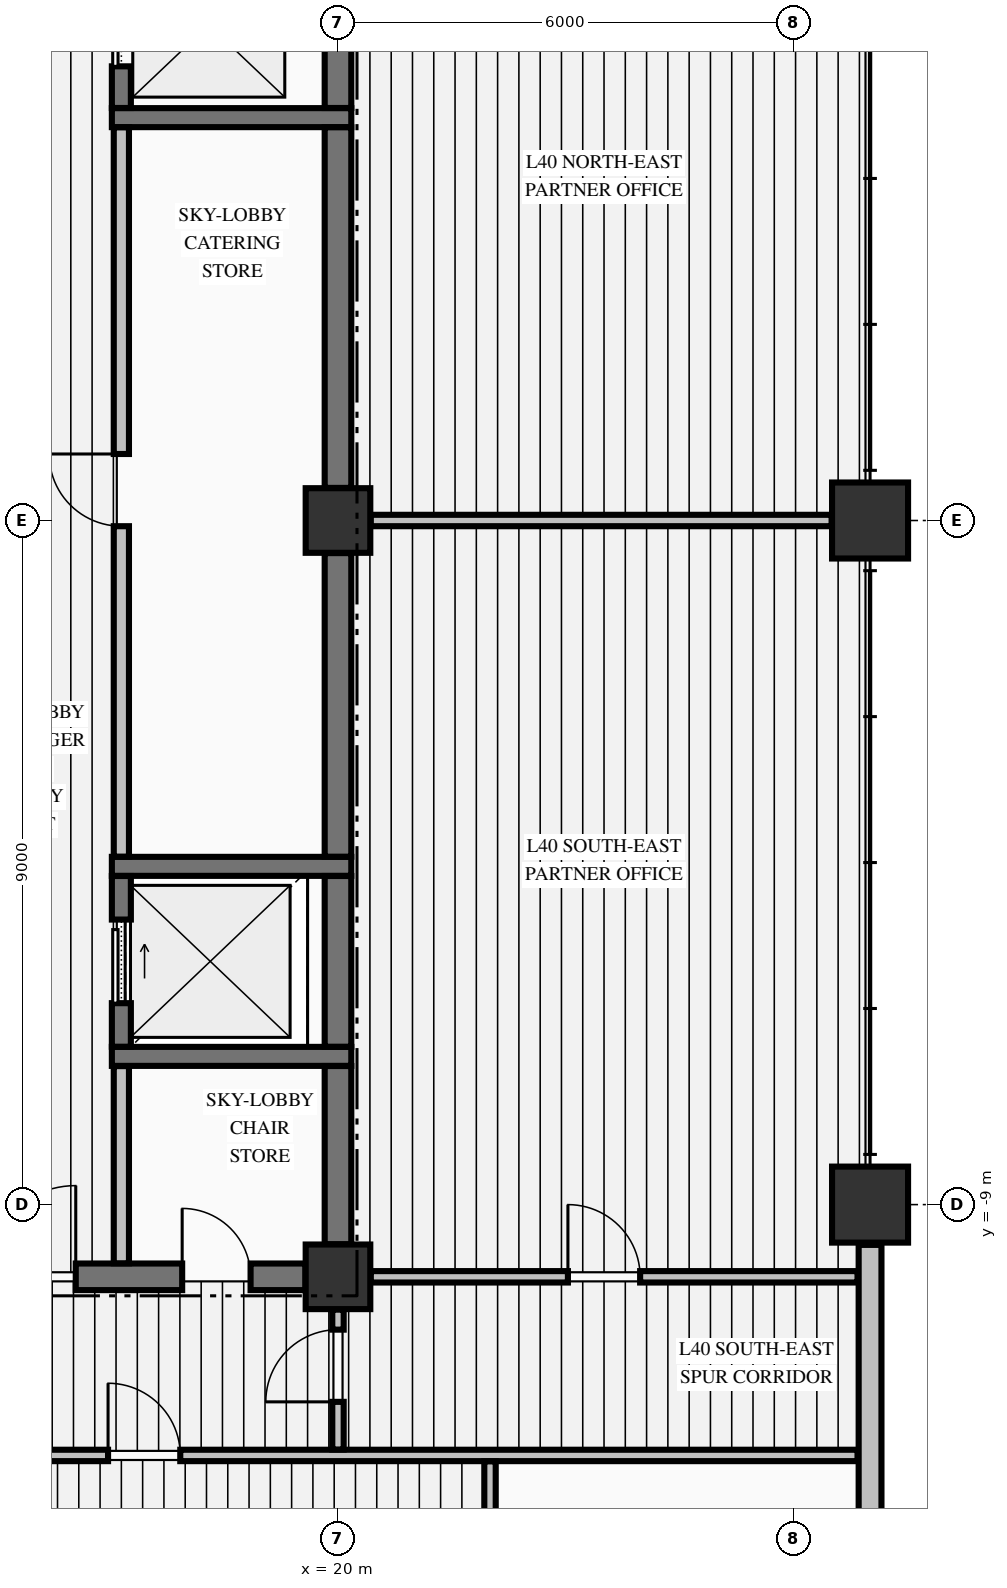
"""IFC4 building model, lengths in metres.
Left out: names, types, materials, properties, quantities, classifications, styles, units other than length and angle.
Written with IfcOpenShell. Run it as: python <this file> out.ifc"""

import sys

from ifc_helpers import new_model, si_unit, direction, frame, frame_2d, origin, origin_2d, place, context, subcontext, project, spatial, rectangle, extrude, element, fill, save


model = new_model("IFC4")
c1 = context("Model", 3, precision=1e-05, world=origin(), true_north=direction((0.0, 1.0)))
c2 = subcontext(c1, "Body", "Model", "MODEL_VIEW")
j1 = project(units=[si_unit("LENGTHUNIT", "METRE"), si_unit("PLANEANGLEUNIT", "RADIAN")], contexts=[c1])
p1 = place(None, origin())
s1 = spatial("IfcSite", under=j1, at=p1, CompositionType="ELEMENT")
p2 = place(p1, origin())
s2 = spatial("IfcBuilding", under=s1, at=p2, CompositionType="ELEMENT")
p3 = place(p2, frame((0.0, 0.0, 158.24)))
s3 = spatial("IfcBuildingStorey", under=s2, at=p3, CompositionType="ELEMENT", Elevation=158.24)
for number, where, z_axis, x_axis in (
    (1, (27.0, -9.0, -0.425), (0.0, 0.0, 1.0), (1.0, 0.0, 0.0)),
    (2, (27.0, 0.0, -0.425), (0.0, 0.0, 1.0), (1.0, 0.0, 0.0)),
):
    element("IfcColumn", number, at=place(p3, frame(where, z_axis=z_axis, x_axis=x_axis)), inside=s3, PredefinedType="COLUMN", context=c2, shape_type="SweptSolid", body=[
        extrude(rectangle(XDim=1.0, YDim=1.0, at=origin_2d()), origin(), (0.0, 0.0, 1.0), 4.595),
    ])
for number, where, z_axis, x_axis in (
    (3, (20.0, -9.95, -0.425), (0.0, 0.0, 1.0), (1.0, 0.0, 0.0)),
    (4, (20.0, 0.0, -0.425), (0.0, 0.0, 1.0), (1.0, 0.0, 0.0)),
):
    element("IfcColumn", number, at=place(p3, frame(where, z_axis=z_axis, x_axis=x_axis)), inside=s3, PredefinedType="COLUMN", context=c2, shape_type="SweptSolid", body=[
        extrude(rectangle(XDim=0.85, YDim=0.85, at=origin_2d()), origin(), (0.0, 0.0, 1.0), 4.595),
    ])
p4 = place(p3, frame((27.0, -18.97, 0.0), z_axis=(0.0, 0.0, 1.0), x_axis=(0.0, 1.0, 0.0)))
e5 = element("IfcWall", 5, at=p4, inside=s3, PredefinedType="STANDARD", context=c2, shape_type="SweptSolid", body=[
    extrude(rectangle(XDim=9.44, YDim=0.3, at=frame_2d((4.72, 0.0))), origin(), (0.0, 0.0, 1.0), 1.962),
])
p5 = place(p3, frame((14.7, -9.95, 0.0), z_axis=(0.0, 0.0, 1.0), x_axis=(1.0, 0.0, 0.0)))
e6 = element("IfcWall", 6, at=p5, inside=s3, PredefinedType="SHEAR", context=c2, shape_type="SweptSolid", body=[
    extrude(rectangle(XDim=4.871, YDim=0.35, at=frame_2d((2.436, 0.0))), origin(), (0.0, 0.0, 1.0), 4.17),
])
p6 = place(p5, frame((0.65, 0.0, 0.0)))
e7 = element("IfcOpeningElement", 7, at=p6, cuts=e6, PredefinedType="OPENING", context=c2, shape_type="SweptSolid", body=[
    extrude(rectangle(XDim=1.2, YDim=2.15, at=frame_2d((0.6, 1.075))), frame((0.0, 0.185, 0.0), z_axis=(0.0, -1.0, 0.0), x_axis=(1.0, 0.0, 0.0)), (0.0, 0.0, 1.0), 0.37),
])
p7 = place(p5, frame((3.25, 0.0, 0.0)))
e8 = element("IfcOpeningElement", 8, at=p7, cuts=e6, PredefinedType="OPENING", context=c2, shape_type="SweptSolid", body=[
    extrude(rectangle(XDim=0.9, YDim=2.15, at=frame_2d((0.45, 1.075))), frame((0.0, 0.185, 0.0), z_axis=(0.0, -1.0, 0.0), x_axis=(1.0, 0.0, 0.0)), (0.0, 0.0, 1.0), 0.37),
])
for number, where, z_axis, x_axis in (
    (9, (17.025, -7.05, 0.0), (0.0, 0.0, 1.0), (1.0, 0.0, 0.0)),
    (10, (17.025, -4.55, 0.0), (0.0, 0.0, 1.0), (1.0, 0.0, 0.0)),
    (11, (17.025, 5.3, 0.0), (0.0, 0.0, 1.0), (1.0, 0.0, 0.0)),
):
    element("IfcWall", number, at=place(p3, frame(where, z_axis=z_axis, x_axis=x_axis)), inside=s3, PredefinedType="SOLIDWALL", context=c2, shape_type="SweptSolid", body=[
        extrude(rectangle(XDim=3.15, YDim=0.25, at=frame_2d((1.575, 0.0))), origin(), (0.0, 0.0, 1.0), 4.17),
    ])
p8 = place(p3, frame((-20.075, -12.3, 0.0), z_axis=(0.0, 0.0, 1.0), x_axis=(1.0, 0.0, 0.0)))
e12 = element("IfcWall", 12, at=p8, inside=s3, PredefinedType="PARTITIONING", context=c2, shape_type="SweptSolid", body=[
    extrude(rectangle(XDim=46.91, YDim=0.15, at=frame_2d((23.455, 0.0))), origin(), (0.0, 0.0, 1.0), 4.17),
])
p9 = place(p8, frame((12.0, 0.0, 0.0)))
e13 = element("IfcOpeningElement", 13, at=p9, cuts=e12, PredefinedType="OPENING", context=c2, shape_type="SweptSolid", body=[
    extrude(rectangle(XDim=1.05, YDim=2.15, at=frame_2d((0.525, 1.075))), frame((0.0, 0.085, 0.0), z_axis=(0.0, -1.0, 0.0), x_axis=(1.0, 0.0, 0.0)), (0.0, 0.0, 1.0), 0.17),
])
p10 = place(p8, frame((16.4, 0.0, 0.0)))
e14 = element("IfcOpeningElement", 14, at=p10, cuts=e12, PredefinedType="OPENING", context=c2, shape_type="SweptSolid", body=[
    extrude(rectangle(XDim=0.95, YDim=2.15, at=frame_2d((0.475, 1.075))), frame((0.0, 0.085, 0.0), z_axis=(0.0, -1.0, 0.0), x_axis=(1.0, 0.0, 0.0)), (0.0, 0.0, 1.0), 0.17),
])
p11 = place(p8, frame((22.3, 0.0, 0.0)))
e15 = element("IfcOpeningElement", 15, at=p11, cuts=e12, PredefinedType="OPENING", context=c2, shape_type="SweptSolid", body=[
    extrude(rectangle(XDim=0.95, YDim=2.15, at=frame_2d((0.475, 1.075))), frame((0.0, 0.085, 0.0), z_axis=(0.0, -1.0, 0.0), x_axis=(1.0, 0.0, 0.0)), (0.0, 0.0, 1.0), 0.17),
])
p12 = place(p8, frame((33.0, 0.0, 0.0)))
e16 = element("IfcOpeningElement", 16, at=p12, cuts=e12, PredefinedType="OPENING", context=c2, shape_type="SweptSolid", body=[
    extrude(rectangle(XDim=1.05, YDim=2.15, at=frame_2d((0.525, 1.075))), frame((0.0, 0.085, 0.0), z_axis=(0.0, -1.0, 0.0), x_axis=(1.0, 0.0, 0.0)), (0.0, 0.0, 1.0), 0.17),
])
p13 = place(p8, frame((37.05, 0.0, 0.0)))
e17 = element("IfcOpeningElement", 17, at=p13, cuts=e12, PredefinedType="OPENING", context=c2, shape_type="SweptSolid", body=[
    extrude(rectangle(XDim=0.95, YDim=2.15, at=frame_2d((0.475, 1.075))), frame((0.0, 0.085, 0.0), z_axis=(0.0, -1.0, 0.0), x_axis=(1.0, 0.0, 0.0)), (0.0, 0.0, 1.0), 0.17),
])
p14 = place(p3, frame((20.431, -9.95, 0.0), z_axis=(0.0, 0.0, 1.0), x_axis=(1.0, 0.0, 0.0)))
e18 = element("IfcWall", 18, at=p14, inside=s3, PredefinedType="PARTITIONING", context=c2, shape_type="SweptSolid", body=[
    extrude(rectangle(XDim=6.404, YDim=0.15, at=frame_2d((3.202, 0.0))), origin(), (0.0, 0.0, 1.0), 4.17),
])
p15 = place(p14, frame((2.594, 0.0, 0.0)))
e19 = element("IfcOpeningElement", 19, at=p15, cuts=e18, PredefinedType="OPENING", context=c2, shape_type="SweptSolid", body=[
    extrude(rectangle(XDim=0.95, YDim=2.15, at=frame_2d((0.475, 1.075))), frame((0.0, 0.085, 0.0), z_axis=(0.0, -1.0, 0.0), x_axis=(1.0, 0.0, 0.0)), (0.0, 0.0, 1.0), 0.17),
])
p16 = place(p3, frame((20.431, 0.0, 0.0), z_axis=(0.0, 0.0, 1.0), x_axis=(1.0, 0.0, 0.0)))
e20 = element("IfcWall", 20, at=p16, inside=s3, PredefinedType="PARTITIONING", context=c2, shape_type="SweptSolid", body=[
    extrude(rectangle(XDim=6.063, YDim=0.15, at=frame_2d((3.031, 0.0))), origin(), (0.0, 0.0, 1.0), 2.362),
])
p17 = place(p3, frame((17.15, -6.923, 0.0), z_axis=(0.0, 0.0, 1.0), x_axis=(0.0, 1.0, 0.0)))
e21 = element("IfcWall", 21, at=p17, inside=s3, PredefinedType="SOLIDWALL", context=c2, shape_type="SweptSolid", body=[
    extrude(rectangle(XDim=2.246, YDim=0.25, at=frame_2d((1.123, 0.0))), origin(), (0.0, 0.0, 1.0), 4.17),
])
p18 = place(p17, frame((0.573, 0.0, 0.0)))
e22 = element("IfcOpeningElement", 22, at=p18, cuts=e21, PredefinedType="OPENING", context=c2, shape_type="SweptSolid", body=[
    extrude(rectangle(XDim=1.1, YDim=2.2, at=frame_2d((0.55, 1.1))), frame((0.0, 0.135, 0.0), z_axis=(0.0, -1.0, 0.0), x_axis=(1.0, 0.0, 0.0)), (0.0, 0.0, 1.0), 0.27),
])
p19 = place(p3, frame((17.15, 5.427, 0.0), z_axis=(0.0, 0.0, 1.0), x_axis=(0.0, 1.0, 0.0)))
e23 = element("IfcWall", 23, at=p19, inside=s3, PredefinedType="SOLIDWALL", context=c2, shape_type="SweptSolid", body=[
    extrude(rectangle(XDim=2.196, YDim=0.25, at=frame_2d((1.098, 0.0))), origin(), (0.0, 0.0, 1.0), 4.17),
])
p20 = place(p19, frame((0.548, 0.0, 0.0)))
e24 = element("IfcOpeningElement", 24, at=p20, cuts=e23, PredefinedType="OPENING", context=c2, shape_type="SweptSolid", body=[
    extrude(rectangle(XDim=1.1, YDim=2.2, at=frame_2d((0.55, 1.1))), frame((0.0, 0.135, 0.0), z_axis=(0.0, -1.0, 0.0), x_axis=(1.0, 0.0, 0.0)), (0.0, 0.0, 1.0), 0.27),
])
p21 = place(p3, frame((20.0, -9.521, 0.0), z_axis=(0.0, 0.0, 1.0), x_axis=(0.0, 1.0, 0.0)))
e25 = element("IfcWall", 25, at=p21, inside=s3, PredefinedType="SHEAR", context=c2, shape_type="SweptSolid", body=[
    extrude(rectangle(XDim=2.344, YDim=0.35, at=frame_2d((1.172, 0.0))), origin(), (0.0, 0.0, 1.0), 4.17),
])
p22 = place(p3, frame((20.0, -6.923, 0.0), z_axis=(0.0, 0.0, 1.0), x_axis=(0.0, 1.0, 0.0)))
e26 = element("IfcWall", 26, at=p22, inside=s3, PredefinedType="SHEAR", context=c2, shape_type="SweptSolid", body=[
    extrude(rectangle(XDim=2.246, YDim=0.35, at=frame_2d((1.123, 0.0))), origin(), (0.0, 0.0, 1.0), 4.17),
])
p23 = place(p3, frame((20.0, -4.423, 0.0), z_axis=(0.0, 0.0, 1.0), x_axis=(0.0, 1.0, 0.0)))
e27 = element("IfcWall", 27, at=p23, inside=s3, PredefinedType="SHEAR", context=c2, shape_type="SweptSolid", body=[
    extrude(rectangle(XDim=3.994, YDim=0.35, at=frame_2d((1.997, 0.0))), origin(), (0.0, 0.0, 1.0), 4.17),
])
p24 = place(p3, frame((20.0, 0.429, 0.0), z_axis=(0.0, 0.0, 1.0), x_axis=(0.0, 1.0, 0.0)))
e28 = element("IfcWall", 28, at=p24, inside=s3, PredefinedType="SHEAR", context=c2, shape_type="SweptSolid", body=[
    extrude(rectangle(XDim=4.744, YDim=0.35, at=frame_2d((2.372, 0.0))), origin(), (0.0, 0.0, 1.0), 4.17),
])
p25 = place(p3, frame((20.0, 5.427, 0.0), z_axis=(0.0, 0.0, 1.0), x_axis=(0.0, 1.0, 0.0)))
e29 = element("IfcWall", 29, at=p25, inside=s3, PredefinedType="SHEAR", context=c2, shape_type="SweptSolid", body=[
    extrude(rectangle(XDim=2.196, YDim=0.35, at=frame_2d((1.098, 0.0))), origin(), (0.0, 0.0, 1.0), 4.17),
])
p26 = place(p3, frame((17.15, -9.772, 0.0), z_axis=(0.0, 0.0, 1.0), x_axis=(0.0, 1.0, 0.0)))
e30 = element("IfcWall", 30, at=p26, inside=s3, PredefinedType="PARTITIONING", context=c2, shape_type="SweptSolid", body=[
    extrude(rectangle(XDim=2.594, YDim=0.2, at=frame_2d((1.297, 0.0))), origin(), (0.0, 0.0, 1.0), 4.17),
])
p27 = place(p3, frame((17.15, -4.422, 0.0), z_axis=(0.0, 0.0, 1.0), x_axis=(0.0, 1.0, 0.0)))
e31 = element("IfcWall", 31, at=p27, inside=s3, PredefinedType="PARTITIONING", context=c2, shape_type="SweptSolid", body=[
    extrude(rectangle(XDim=9.594, YDim=0.2, at=frame_2d((4.797, 0.0))), origin(), (0.0, 0.0, 1.0), 4.17),
])
p28 = place(p27, frame((4.347, 0.0, 0.0)))
e32 = element("IfcOpeningElement", 32, at=p28, cuts=e31, PredefinedType="OPENING", context=c2, shape_type="SweptSolid", body=[
    extrude(rectangle(XDim=0.95, YDim=2.15, at=frame_2d((0.475, 1.075))), frame((0.0, 0.11, 0.0), z_axis=(0.0, -1.0, 0.0), x_axis=(1.0, 0.0, 0.0)), (0.0, 0.0, 1.0), 0.22),
])
p29 = place(p3, frame((20.0, -12.222, 0.0), z_axis=(0.0, 0.0, 1.0), x_axis=(0.0, 1.0, 0.0)))
e33 = element("IfcWall", 33, at=p29, inside=s3, PredefinedType="PARTITIONING", context=c2, shape_type="SweptSolid", body=[
    extrude(rectangle(XDim=1.841, YDim=0.15, at=frame_2d((0.92, 0.0))), origin(), (0.0, 0.0, 1.0), 3.36),
])
p30 = place(p29, frame((0.627, 0.0, 0.0)))
e34 = element("IfcOpeningElement", 34, at=p30, cuts=e33, PredefinedType="OPENING", context=c2, shape_type="SweptSolid", body=[
    extrude(rectangle(XDim=0.95, YDim=2.15, at=frame_2d((0.475, 1.075))), frame((0.0, 0.085, 0.0), z_axis=(0.0, -1.0, 0.0), x_axis=(1.0, 0.0, 0.0)), (0.0, 0.0, 1.0), 0.17),
])
p31 = place(p3, frame((22.0, -18.994, 0.0), z_axis=(0.0, 0.0, 1.0), x_axis=(0.0, 1.0, 0.0)))
e35 = element("IfcWall", 35, at=p31, inside=s3, PredefinedType="PARTITIONING", context=c2, shape_type="SweptSolid", body=[
    extrude(rectangle(XDim=6.616, YDim=0.15, at=frame_2d((3.308, 0.0))), origin(), (0.0, 0.0, 1.0), 4.17),
])
p32 = place(p18, origin())
e36 = element("IfcDoor", 36, at=p32, inside=s3, OperationType="SLIDING_TO_RIGHT", PredefinedType="DOOR", context=c2, shape_type="SweptSolid", body=[
    extrude(rectangle(XDim=1.1, YDim=2.2, at=frame_2d((0.55, 1.1))), frame((0.0, 0.025, 0.0), z_axis=(0.0, -1.0, 0.0), x_axis=(1.0, 0.0, 0.0)), (0.0, 0.0, 1.0), 0.05),
])
fill(e22, e36)
p33 = place(p20, origin())
e37 = element("IfcDoor", 37, at=p33, inside=s3, OperationType="SLIDING_TO_RIGHT", PredefinedType="DOOR", context=c2, shape_type="SweptSolid", body=[
    extrude(rectangle(XDim=1.1, YDim=2.2, at=frame_2d((0.55, 1.1))), frame((0.0, 0.025, 0.0), z_axis=(0.0, -1.0, 0.0), x_axis=(1.0, 0.0, 0.0)), (0.0, 0.0, 1.0), 0.05),
])
fill(e24, e37)
p34 = place(p6, origin())
e38 = element("IfcDoor", 38, at=p34, inside=s3, OperationType="SINGLE_SWING_RIGHT", PredefinedType="DOOR", context=c2, shape_type="SweptSolid", body=[
    extrude(rectangle(XDim=1.2, YDim=2.15, at=frame_2d((0.6, 1.075))), frame((0.0, 0.025, 0.0), z_axis=(0.0, -1.0, 0.0), x_axis=(1.0, 0.0, 0.0)), (0.0, 0.0, 1.0), 0.05),
])
fill(e7, e38)
p35 = place(p28, origin())
e39 = element("IfcDoor", 39, at=p35, inside=s3, OperationType="SINGLE_SWING_RIGHT", PredefinedType="DOOR", context=c2, shape_type="SweptSolid", body=[
    extrude(rectangle(XDim=0.95, YDim=2.15, at=frame_2d((0.475, 1.075))), frame((0.0, 0.025, 0.0), z_axis=(0.0, -1.0, 0.0), x_axis=(1.0, 0.0, 0.0)), (0.0, 0.0, 1.0), 0.05),
])
fill(e32, e39)
p36 = place(p7, origin())
e40 = element("IfcDoor", 40, at=p36, inside=s3, OperationType="SINGLE_SWING_LEFT", PredefinedType="DOOR", context=c2, shape_type="SweptSolid", body=[
    extrude(rectangle(XDim=0.9, YDim=2.15, at=frame_2d((0.45, 1.075))), frame((0.0, 0.025, 0.0), z_axis=(0.0, -1.0, 0.0), x_axis=(1.0, 0.0, 0.0)), (0.0, 0.0, 1.0), 0.05),
])
fill(e8, e40)
p37 = place(p13, origin())
e41 = element("IfcDoor", 41, at=p37, inside=s3, OperationType="SINGLE_SWING_LEFT", PredefinedType="DOOR", context=c2, shape_type="SweptSolid", body=[
    extrude(rectangle(XDim=0.95, YDim=2.15, at=frame_2d((0.475, 1.075))), frame((0.0, 0.025, 0.0), z_axis=(0.0, -1.0, 0.0), x_axis=(1.0, 0.0, 0.0)), (0.0, 0.0, 1.0), 0.05),
])
fill(e17, e41)
p38 = place(p30, origin())
e42 = element("IfcDoor", 42, at=p38, inside=s3, OperationType="SINGLE_SWING_LEFT", PredefinedType="DOOR", context=c2, shape_type="SweptSolid", body=[
    extrude(rectangle(XDim=0.95, YDim=2.15, at=frame_2d((0.475, 1.075))), frame((0.0, 0.025, 0.0), z_axis=(0.0, -1.0, 0.0), x_axis=(1.0, 0.0, 0.0)), (0.0, 0.0, 1.0), 0.05),
])
fill(e34, e42)
p39 = place(p15, origin())
e43 = element("IfcDoor", 43, at=p39, inside=s3, OperationType="SINGLE_SWING_LEFT", PredefinedType="DOOR", context=c2, shape_type="SweptSolid", body=[
    extrude(rectangle(XDim=0.95, YDim=2.15, at=frame_2d((0.475, 1.075))), frame((0.0, 0.025, 0.0), z_axis=(0.0, -1.0, 0.0), x_axis=(1.0, 0.0, 0.0)), (0.0, 0.0, 1.0), 0.05),
])
fill(e19, e43)
save(model, sys.argv[1])
